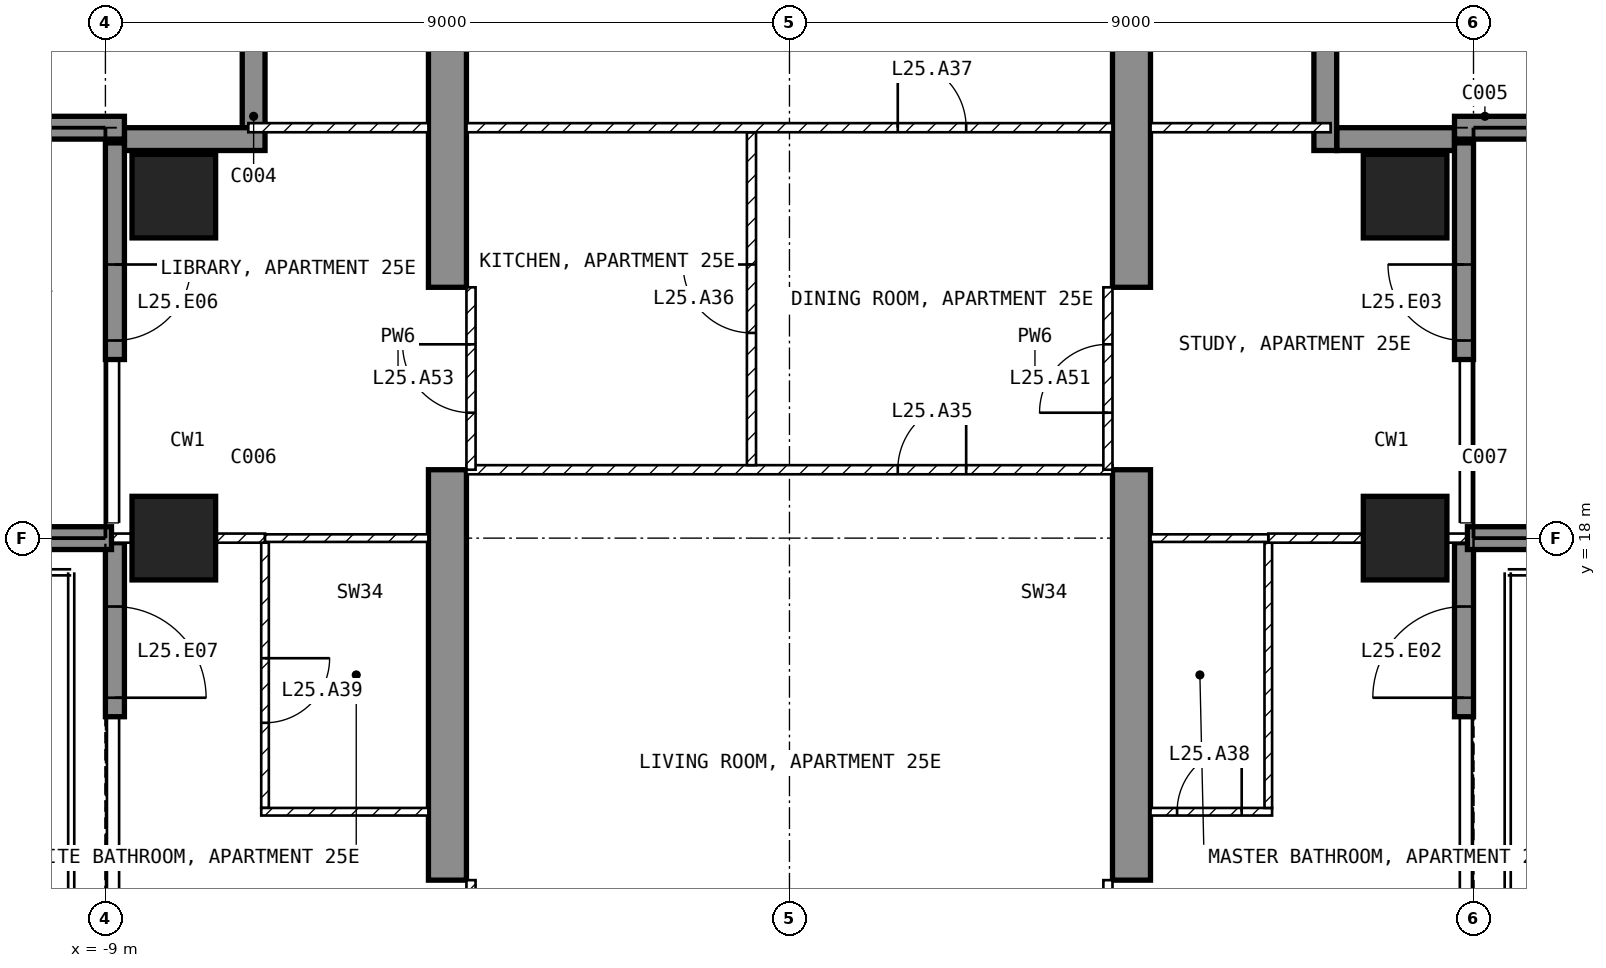
"""IFC4 building model, lengths in metres.
Left out: names, types, materials, properties, quantities, classifications, styles, units other than length and angle.
Written with IfcOpenShell. Run it as: python <this file> out.ifc"""

import sys

from ifc_helpers import new_model, si_unit, direction, frame, frame_2d, origin, origin_2d, place, context, subcontext, project, spatial, polyline, rectangle, outline, extrude, element, fill, save


model = new_model("IFC4")
c1 = context("Model", 3, precision=1e-05, world=origin(), true_north=direction((0.0, 1.0)))
c2 = subcontext(c1, "Body", "Model", "MODEL_VIEW")
j1 = project(units=[si_unit("LENGTHUNIT", "METRE"), si_unit("PLANEANGLEUNIT", "RADIAN")], contexts=[c1])
p1 = place(None, origin())
s1 = spatial("IfcSite", under=j1, at=p1, CompositionType="ELEMENT")
p2 = place(p1, origin())
s2 = spatial("IfcBuilding", under=s1, at=p2, CompositionType="ELEMENT")
p3 = place(p2, frame((0.0, 0.0, 109.4)))
s3 = spatial("IfcBuildingStorey", under=s2, at=p3, CompositionType="ELEMENT", Elevation=109.4)
for number, where, z_axis, x_axis in (
    (1, (-8.1, 18.0, -0.25), (0.0, 0.0, 1.0), (1.0, 0.0, 0.0)),
    (2, (-8.1, 22.5, -0.25), (0.0, 0.0, 1.0), (1.0, 0.0, 0.0)),
    (3, (8.1, 18.0, -0.25), (0.0, 0.0, 1.0), (1.0, 0.0, 0.0)),
    (4, (8.1, 22.5, -0.25), (0.0, 0.0, 1.0), (1.0, 0.0, 0.0)),
):
    element("IfcColumn", number, at=place(p3, frame(where, z_axis=z_axis, x_axis=x_axis)), inside=s3, PredefinedType="COLUMN", context=c2, shape_type="SweptSolid", body=[
        extrude(rectangle(XDim=1.1, YDim=1.1, at=origin_2d()), origin(), (0.0, 0.0, 1.0), 3.5),
    ])
for number, where, z_axis, x_axis in (
    (5, (-4.75, 9.0, -0.25), (1.0, 0.0, 0.0), (0.0, 1.0, 0.0)),
    (6, (4.25, 9.0, -0.25), (1.0, 0.0, 0.0), (0.0, 1.0, 0.0)),
):
    element("IfcWall", number, at=place(p3, frame(where, z_axis=z_axis, x_axis=x_axis)), inside=s3, PredefinedType="SHEAR", context=c2, shape_type="SweptSolid", body=[
        extrude(outline(polyline([(0.0, 0.0), (2.1, 0.0), (2.1, 2.65), (4.5, 2.65), (4.5, 0.0), (9.9, 0.0), (9.9, 2.65), (12.3, 2.65), (12.3, 0.0), (16.55, 0.0), (16.55, 3.5), (0.0, 3.5), (0.0, 0.0)])), origin(), (0.0, 0.0, 1.0), 0.5),
    ])
p4 = place(p3, frame((8.875, 15.65, 0.0), z_axis=(0.0, 0.0, 1.0), x_axis=(0.0, 1.0, 0.0)))
e7 = element("IfcWall", 7, at=p4, inside=s3, PredefinedType="SOLIDWALL", context=c2, shape_type="SweptSolid", body=[
    extrude(rectangle(XDim=2.29, YDim=0.25, at=frame_2d((1.145, 0.0))), origin(), (0.0, 0.0, 1.0), 3.25),
])
p5 = place(p4, frame((0.25, 0.0, 0.0)))
e8 = element("IfcOpeningElement", 8, at=p5, cuts=e7, PredefinedType="OPENING", context=c2, shape_type="SweptSolid", body=[
    extrude(rectangle(XDim=1.2, YDim=2.4, at=frame_2d((0.6, 1.2))), frame((0.0, 0.135, 0.0), z_axis=(0.0, -1.0, 0.0), x_axis=(1.0, 0.0, 0.0)), (0.0, 0.0, 1.0), 0.27),
])
p6 = place(p3, frame((8.875, 20.35, 0.0), z_axis=(0.0, 0.0, 1.0), x_axis=(0.0, 1.0, 0.0)))
e9 = element("IfcWall", 9, at=p6, inside=s3, PredefinedType="SOLIDWALL", context=c2, shape_type="SweptSolid", body=[
    extrude(rectangle(XDim=2.85, YDim=0.25, at=frame_2d((1.425, 0.0))), origin(), (0.0, 0.0, 1.0), 3.25),
])
p7 = place(p6, frame((0.25, 0.0, 0.0)))
e10 = element("IfcOpeningElement", 10, at=p7, cuts=e9, PredefinedType="OPENING", context=c2, shape_type="SweptSolid", body=[
    extrude(rectangle(XDim=1.0, YDim=2.4, at=frame_2d((0.5, 1.2))), frame((0.0, 0.135, 0.0), z_axis=(0.0, -1.0, 0.0), x_axis=(1.0, 0.0, 0.0)), (0.0, 0.0, 1.0), 0.27),
])
p8 = place(p3, frame((-8.875, 23.2, 0.0), z_axis=(0.0, 0.0, 1.0), x_axis=(0.0, -1.0, 0.0)))
e11 = element("IfcWall", 11, at=p8, inside=s3, PredefinedType="SOLIDWALL", context=c2, shape_type="SweptSolid", body=[
    extrude(rectangle(XDim=2.85, YDim=0.25, at=frame_2d((1.425, 0.0))), origin(), (0.0, 0.0, 1.0), 3.25),
])
p9 = place(p8, frame((1.6, 0.0, 0.0)))
e12 = element("IfcOpeningElement", 12, at=p9, cuts=e11, PredefinedType="OPENING", context=c2, shape_type="SweptSolid", body=[
    extrude(rectangle(XDim=1.0, YDim=2.4, at=frame_2d((0.5, 1.2))), frame((0.0, 0.135, 0.0), z_axis=(0.0, -1.0, 0.0), x_axis=(1.0, 0.0, 0.0)), (0.0, 0.0, 1.0), 0.27),
])
p10 = place(p3, frame((-8.875, 17.94, 0.0), z_axis=(0.0, 0.0, 1.0), x_axis=(0.0, -1.0, 0.0)))
e13 = element("IfcWall", 13, at=p10, inside=s3, PredefinedType="SOLIDWALL", context=c2, shape_type="SweptSolid", body=[
    extrude(rectangle(XDim=2.29, YDim=0.25, at=frame_2d((1.145, 0.0))), origin(), (0.0, 0.0, 1.0), 3.25),
])
p11 = place(p10, frame((0.84, 0.0, 0.0)))
e14 = element("IfcOpeningElement", 14, at=p11, cuts=e13, PredefinedType="OPENING", context=c2, shape_type="SweptSolid", body=[
    extrude(rectangle(XDim=1.2, YDim=2.4, at=frame_2d((0.6, 1.2))), frame((0.0, 0.135, 0.0), z_axis=(0.0, -1.0, 0.0), x_axis=(1.0, 0.0, 0.0)), (0.0, 0.0, 1.0), 0.27),
])
p12 = place(p3, frame((8.75, 23.25, 0.0), z_axis=(0.0, 0.0, 1.0), x_axis=(-1.0, 0.0, 0.0)))
e15 = element("IfcWall", 15, at=p12, inside=s3, PredefinedType="SOLIDWALL", context=c2, shape_type="SweptSolid", body=[
    extrude(rectangle(XDim=1.55, YDim=0.3, at=frame_2d((0.775, 0.0))), origin(), (0.0, 0.0, 1.0), 3.25),
])
p13 = place(p3, frame((7.05, 23.1, 0.0), z_axis=(0.0, 0.0, 1.0), x_axis=(0.0, 1.0, 0.0)))
e16 = element("IfcWall", 16, at=p13, inside=s3, PredefinedType="SOLIDWALL", context=c2, shape_type="SweptSolid", body=[
    extrude(rectangle(XDim=1.8, YDim=0.3, at=frame_2d((0.9, 0.0))), origin(), (0.0, 0.0, 1.0), 3.25),
])
p14 = place(p3, frame((-7.05, 25.2, 0.0), z_axis=(0.0, 0.0, 1.0), x_axis=(0.0, -1.0, 0.0)))
e17 = element("IfcWall", 17, at=p14, inside=s3, PredefinedType="SOLIDWALL", context=c2, shape_type="SweptSolid", body=[
    extrude(rectangle(XDim=1.8, YDim=0.3, at=frame_2d((0.9, 0.0))), origin(), (0.0, 0.0, 1.0), 3.25),
])
p15 = place(p3, frame((-6.9, 23.25, 0.0), z_axis=(0.0, 0.0, 1.0), x_axis=(-1.0, 0.0, 0.0)))
e18 = element("IfcWall", 18, at=p15, inside=s3, PredefinedType="SOLIDWALL", context=c2, shape_type="SweptSolid", body=[
    extrude(rectangle(XDim=1.85, YDim=0.3, at=frame_2d((0.925, 0.0))), origin(), (0.0, 0.0, 1.0), 3.25),
])
p16 = place(p3, frame((-8.92, 18.0, 0.0), z_axis=(0.0, 0.0, 1.0), x_axis=(-1.0, 0.0, 0.0)))
e19 = element("IfcWall", 19, at=p16, inside=s3, PredefinedType="SOLIDWALL", context=c2, shape_type="SweptSolid", body=[
    extrude(rectangle(XDim=2.82, YDim=0.3, at=frame_2d((1.41, 0.0))), origin(), (0.0, 0.0, 1.0), 3.25),
])
p17 = place(p3, frame((-8.75, 23.4, 0.0), z_axis=(0.0, 0.0, 1.0), x_axis=(-1.0, 0.0, 0.0)))
e20 = element("IfcWall", 20, at=p17, inside=s3, PredefinedType="SOLIDWALL", context=c2, shape_type="SweptSolid", body=[
    extrude(rectangle(XDim=2.95, YDim=0.3, at=frame_2d((1.475, 0.0))), origin(), (0.0, 0.0, 1.0), 3.25),
])
p18 = place(p3, frame((8.92, 18.0, 0.0), z_axis=(0.0, 0.0, 1.0), x_axis=(1.0, 0.0, 0.0)))
e21 = element("IfcWall", 21, at=p18, inside=s3, PredefinedType="SOLIDWALL", context=c2, shape_type="SweptSolid", body=[
    extrude(rectangle(XDim=2.82, YDim=0.3, at=frame_2d((1.41, 0.0))), origin(), (0.0, 0.0, 1.0), 3.25),
])
p19 = place(p3, frame((8.75, 23.4, 0.0), z_axis=(0.0, 0.0, 1.0), x_axis=(1.0, 0.0, 0.0)))
e22 = element("IfcWall", 22, at=p19, inside=s3, PredefinedType="SOLIDWALL", context=c2, shape_type="SweptSolid", body=[
    extrude(rectangle(XDim=2.95, YDim=0.3, at=frame_2d((1.475, 0.0))), origin(), (0.0, 0.0, 1.0), 3.25),
])
p20 = place(p3, frame((-4.25, 18.9, 0.0), z_axis=(0.0, 0.0, 1.0), x_axis=(1.0, 0.0, 0.0)))
e23 = element("IfcWall", 23, at=p20, inside=s3, PredefinedType="PARTITIONING", context=c2, shape_type="SweptSolid", body=[
    extrude(rectangle(XDim=8.5, YDim=0.12, at=frame_2d((4.25, 0.0))), origin(), (0.0, 0.0, 1.0), 3.25),
])
p21 = place(p20, frame((5.675, 0.0, 0.0)))
e24 = element("IfcOpeningElement", 24, at=p21, cuts=e23, PredefinedType="OPENING", context=c2, shape_type="SweptSolid", body=[
    extrude(rectangle(XDim=0.9, YDim=2.1, at=frame_2d((0.45, 1.05))), frame((0.0, 0.07, 0.0), z_axis=(0.0, -1.0, 0.0), x_axis=(1.0, 0.0, 0.0)), (0.0, 0.0, 1.0), 0.14),
])
p22 = place(p3, frame((-0.5, 18.96, 0.0), z_axis=(0.0, 0.0, 1.0), x_axis=(0.0, 1.0, 0.0)))
e25 = element("IfcWall", 25, at=p22, inside=s3, PredefinedType="PARTITIONING", context=c2, shape_type="SweptSolid", body=[
    extrude(rectangle(XDim=4.38, YDim=0.12, at=frame_2d((2.19, 0.0))), origin(), (0.0, 0.0, 1.0), 3.25),
])
p23 = place(p22, frame((1.74, 0.0, 0.0)))
e26 = element("IfcOpeningElement", 26, at=p23, cuts=e25, PredefinedType="OPENING", context=c2, shape_type="SweptSolid", body=[
    extrude(rectangle(XDim=0.9, YDim=2.1, at=frame_2d((0.45, 1.05))), frame((0.0, 0.07, 0.0), z_axis=(0.0, -1.0, 0.0), x_axis=(1.0, 0.0, 0.0)), (0.0, 0.0, 1.0), 0.14),
])
p24 = place(p3, frame((-4.25, 23.4, 0.0), z_axis=(0.0, 0.0, 1.0), x_axis=(1.0, 0.0, 0.0)))
e27 = element("IfcWall", 27, at=p24, inside=s3, PredefinedType="PARTITIONING", context=c2, shape_type="SweptSolid", body=[
    extrude(rectangle(XDim=8.5, YDim=0.12, at=frame_2d((4.25, 0.0))), origin(), (0.0, 0.0, 1.0), 3.25),
])
p25 = place(p24, frame((5.675, 0.0, 0.0)))
e28 = element("IfcOpeningElement", 28, at=p25, cuts=e27, PredefinedType="OPENING", context=c2, shape_type="SweptSolid", body=[
    extrude(rectangle(XDim=0.9, YDim=2.1, at=frame_2d((0.45, 1.05))), frame((0.0, 0.07, 0.0), z_axis=(0.0, -1.0, 0.0), x_axis=(1.0, 0.0, 0.0)), (0.0, 0.0, 1.0), 0.14),
])
p26 = place(p3, frame((4.75, 14.4, 0.0), z_axis=(0.0, 0.0, 1.0), x_axis=(1.0, 0.0, 0.0)))
e29 = element("IfcWall", 29, at=p26, inside=s3, PredefinedType="PARTITIONING", context=c2, shape_type="SweptSolid", body=[
    extrude(rectangle(XDim=1.6, YDim=0.1, at=frame_2d((0.8, 0.0))), origin(), (0.0, 0.0, 1.0), 3.25),
])
p27 = place(p26, frame((0.35, 0.0, 0.0)))
e30 = element("IfcOpeningElement", 30, at=p27, cuts=e29, PredefinedType="OPENING", context=c2, shape_type="SweptSolid", body=[
    extrude(rectangle(XDim=0.85, YDim=2.1, at=frame_2d((0.425, 1.05))), frame((0.0, 0.06, 0.0), z_axis=(0.0, -1.0, 0.0), x_axis=(1.0, 0.0, 0.0)), (0.0, 0.0, 1.0), 0.12),
])
p28 = place(p3, frame((6.3, 14.45, 0.0), z_axis=(0.0, 0.0, 1.0), x_axis=(0.0, 1.0, 0.0)))
e31 = element("IfcWall", 31, at=p28, inside=s3, PredefinedType="PARTITIONING", context=c2, shape_type="SweptSolid", body=[
    extrude(rectangle(XDim=3.49, YDim=0.1, at=frame_2d((1.745, 0.0))), origin(), (0.0, 0.0, 1.0), 3.25),
])
p29 = place(p3, frame((6.3, 18.0, 0.0), z_axis=(0.0, 0.0, 1.0), x_axis=(1.0, 0.0, 0.0)))
e32 = element("IfcWall", 32, at=p29, inside=s3, PredefinedType="PARTITIONING", context=c2, shape_type="SweptSolid", body=[
    extrude(rectangle(XDim=2.62, YDim=0.12, at=frame_2d((1.31, 0.0))), origin(), (0.0, 0.0, 1.0), 2.414),
])
p30 = place(p3, frame((4.75, 18.0, 0.0), z_axis=(0.0, 0.0, 1.0), x_axis=(1.0, 0.0, 0.0)))
e33 = element("IfcWall", 33, at=p30, inside=s3, PredefinedType="PARTITIONING", context=c2, shape_type="SweptSolid", body=[
    extrude(rectangle(XDim=1.55, YDim=0.1, at=frame_2d((0.775, 0.0))), origin(), (0.0, 0.0, 1.0), 2.414),
])
p31 = place(p3, frame((4.75, 23.4, 0.0), z_axis=(0.0, 0.0, 1.0), x_axis=(1.0, 0.0, 0.0)))
e34 = element("IfcWall", 34, at=p31, inside=s3, PredefinedType="PARTITIONING", context=c2, shape_type="SweptSolid", body=[
    extrude(rectangle(XDim=2.37, YDim=0.12, at=frame_2d((1.185, 0.0))), origin(), (0.0, 0.0, 1.0), 3.25),
])
p32 = place(p3, frame((-6.9, 17.94, 0.0), z_axis=(0.0, 0.0, 1.0), x_axis=(0.0, -1.0, 0.0)))
e35 = element("IfcWall", 35, at=p32, inside=s3, PredefinedType="PARTITIONING", context=c2, shape_type="SweptSolid", body=[
    extrude(rectangle(XDim=3.49, YDim=0.1, at=frame_2d((1.745, 0.0))), origin(), (0.0, 0.0, 1.0), 3.25),
])
p33 = place(p32, frame((1.52, 0.0, 0.0)))
e36 = element("IfcOpeningElement", 36, at=p33, cuts=e35, PredefinedType="OPENING", context=c2, shape_type="SweptSolid", body=[
    extrude(rectangle(XDim=0.85, YDim=2.1, at=frame_2d((0.425, 1.05))), frame((0.0, 0.06, 0.0), z_axis=(0.0, -1.0, 0.0), x_axis=(1.0, 0.0, 0.0)), (0.0, 0.0, 1.0), 0.12),
])
p34 = place(p3, frame((-6.95, 14.4, 0.0), z_axis=(0.0, 0.0, 1.0), x_axis=(1.0, 0.0, 0.0)))
e37 = element("IfcWall", 37, at=p34, inside=s3, PredefinedType="PARTITIONING", context=c2, shape_type="SweptSolid", body=[
    extrude(rectangle(XDim=2.2, YDim=0.1, at=frame_2d((1.1, 0.0))), origin(), (0.0, 0.0, 1.0), 3.25),
])
p35 = place(p3, frame((-8.92, 18.0, 0.0), z_axis=(0.0, 0.0, 1.0), x_axis=(1.0, 0.0, 0.0)))
e38 = element("IfcWall", 38, at=p35, inside=s3, PredefinedType="PARTITIONING", context=c2, shape_type="SweptSolid", body=[
    extrude(rectangle(XDim=2.02, YDim=0.12, at=frame_2d((1.01, 0.0))), origin(), (0.0, 0.0, 1.0), 2.414),
])
p36 = place(p3, frame((-6.9, 18.0, 0.0), z_axis=(0.0, 0.0, 1.0), x_axis=(1.0, 0.0, 0.0)))
e39 = element("IfcWall", 39, at=p36, inside=s3, PredefinedType="PARTITIONING", context=c2, shape_type="SweptSolid", body=[
    extrude(rectangle(XDim=2.15, YDim=0.1, at=frame_2d((1.075, 0.0))), origin(), (0.0, 0.0, 1.0), 2.414),
])
p37 = place(p3, frame((-7.12, 23.4, 0.0), z_axis=(0.0, 0.0, 1.0), x_axis=(1.0, 0.0, 0.0)))
e40 = element("IfcWall", 40, at=p37, inside=s3, PredefinedType="PARTITIONING", context=c2, shape_type="SweptSolid", body=[
    extrude(rectangle(XDim=2.37, YDim=0.12, at=frame_2d((1.185, 0.0))), origin(), (0.0, 0.0, 1.0), 3.25),
])
p38 = place(p3, frame((4.19, 11.1, 0.0), z_axis=(0.0, 0.0, 1.0), x_axis=(0.0, 1.0, 0.0)))
e41 = element("IfcWall", 41, at=p38, inside=s3, PredefinedType="PARTITIONING", context=c2, shape_type="SweptSolid", body=[
    extrude(rectangle(XDim=2.4, YDim=0.12, at=frame_2d((1.2, 0.0))), origin(), (0.0, 0.0, 1.0), 2.4),
])
p39 = place(p38, frame((0.75, 0.0, 0.0)))
e42 = element("IfcOpeningElement", 42, at=p39, cuts=e41, PredefinedType="OPENING", context=c2, shape_type="SweptSolid", body=[
    extrude(rectangle(XDim=0.9, YDim=2.1, at=frame_2d((0.45, 1.05))), frame((0.0, 0.07, 0.0), z_axis=(0.0, -1.0, 0.0), x_axis=(1.0, 0.0, 0.0)), (0.0, 0.0, 1.0), 0.14),
])
p40 = place(p3, frame((4.19, 18.9, 0.0), z_axis=(0.0, 0.0, 1.0), x_axis=(0.0, 1.0, 0.0)))
e43 = element("IfcWall", 43, at=p40, inside=s3, PredefinedType="PARTITIONING", context=c2, shape_type="SweptSolid", body=[
    extrude(rectangle(XDim=2.4, YDim=0.12, at=frame_2d((1.2, 0.0))), origin(), (0.0, 0.0, 1.0), 2.4),
])
p41 = place(p40, frame((0.75, 0.0, 0.0)))
e44 = element("IfcOpeningElement", 44, at=p41, cuts=e43, PredefinedType="OPENING", context=c2, shape_type="SweptSolid", body=[
    extrude(rectangle(XDim=0.9, YDim=2.1, at=frame_2d((0.45, 1.05))), frame((0.0, 0.07, 0.0), z_axis=(0.0, -1.0, 0.0), x_axis=(1.0, 0.0, 0.0)), (0.0, 0.0, 1.0), 0.14),
])
p42 = place(p3, frame((-4.19, 11.1, 0.0), z_axis=(0.0, 0.0, 1.0), x_axis=(0.0, 1.0, 0.0)))
e45 = element("IfcWall", 45, at=p42, inside=s3, PredefinedType="PARTITIONING", context=c2, shape_type="SweptSolid", body=[
    extrude(rectangle(XDim=2.4, YDim=0.12, at=frame_2d((1.2, 0.0))), origin(), (0.0, 0.0, 1.0), 2.4),
])
p43 = place(p42, frame((0.75, 0.0, 0.0)))
e46 = element("IfcOpeningElement", 46, at=p43, cuts=e45, PredefinedType="OPENING", context=c2, shape_type="SweptSolid", body=[
    extrude(rectangle(XDim=0.9, YDim=2.1, at=frame_2d((0.45, 1.05))), frame((0.0, 0.07, 0.0), z_axis=(0.0, -1.0, 0.0), x_axis=(1.0, 0.0, 0.0)), (0.0, 0.0, 1.0), 0.14),
])
p44 = place(p3, frame((-4.19, 18.9, 0.0), z_axis=(0.0, 0.0, 1.0), x_axis=(0.0, 1.0, 0.0)))
e47 = element("IfcWall", 47, at=p44, inside=s3, PredefinedType="PARTITIONING", context=c2, shape_type="SweptSolid", body=[
    extrude(rectangle(XDim=2.4, YDim=0.12, at=frame_2d((1.2, 0.0))), origin(), (0.0, 0.0, 1.0), 2.4),
])
p45 = place(p44, frame((0.75, 0.0, 0.0)))
e48 = element("IfcOpeningElement", 48, at=p45, cuts=e47, PredefinedType="OPENING", context=c2, shape_type="SweptSolid", body=[
    extrude(rectangle(XDim=0.9, YDim=2.1, at=frame_2d((0.45, 1.05))), frame((0.0, 0.07, 0.0), z_axis=(0.0, -1.0, 0.0), x_axis=(1.0, 0.0, 0.0)), (0.0, 0.0, 1.0), 0.14),
])
p46 = place(p5, origin())
e49 = element("IfcDoor", 49, at=p46, inside=s3, OperationType="SINGLE_SWING_LEFT", PredefinedType="DOOR", context=c2, shape_type="SweptSolid", body=[
    extrude(rectangle(XDim=1.2, YDim=2.4, at=frame_2d((0.6, 1.2))), frame((0.0, 0.025, 0.0), z_axis=(0.0, -1.0, 0.0), x_axis=(1.0, 0.0, 0.0)), (0.0, 0.0, 1.0), 0.05),
])
fill(e8, e49)
p47 = place(p7, origin())
e50 = element("IfcDoor", 50, at=p47, inside=s3, OperationType="SINGLE_SWING_RIGHT", PredefinedType="DOOR", context=c2, shape_type="SweptSolid", body=[
    extrude(rectangle(XDim=1.0, YDim=2.4, at=frame_2d((0.5, 1.2))), frame((0.0, 0.025, 0.0), z_axis=(0.0, -1.0, 0.0), x_axis=(1.0, 0.0, 0.0)), (0.0, 0.0, 1.0), 0.05),
])
fill(e10, e50)
p48 = place(p9, origin())
e51 = element("IfcDoor", 51, at=p48, inside=s3, OperationType="SINGLE_SWING_LEFT", PredefinedType="DOOR", context=c2, shape_type="SweptSolid", body=[
    extrude(rectangle(XDim=1.0, YDim=2.4, at=frame_2d((0.5, 1.2))), frame((0.0, 0.025, 0.0), z_axis=(0.0, -1.0, 0.0), x_axis=(1.0, 0.0, 0.0)), (0.0, 0.0, 1.0), 0.05),
])
fill(e12, e51)
p49 = place(p11, origin())
e52 = element("IfcDoor", 52, at=p49, inside=s3, OperationType="SINGLE_SWING_RIGHT", PredefinedType="DOOR", context=c2, shape_type="SweptSolid", body=[
    extrude(rectangle(XDim=1.2, YDim=2.4, at=frame_2d((0.6, 1.2))), frame((0.0, 0.025, 0.0), z_axis=(0.0, -1.0, 0.0), x_axis=(1.0, 0.0, 0.0)), (0.0, 0.0, 1.0), 0.05),
])
fill(e14, e52)
p50 = place(p21, origin())
e53 = element("IfcDoor", 53, at=p50, inside=s3, OperationType="SINGLE_SWING_RIGHT", PredefinedType="DOOR", context=c2, shape_type="SweptSolid", body=[
    extrude(rectangle(XDim=0.9, YDim=2.1, at=frame_2d((0.45, 1.05))), frame((0.0, 0.025, 0.0), z_axis=(0.0, -1.0, 0.0), x_axis=(1.0, 0.0, 0.0)), (0.0, 0.0, 1.0), 0.05),
])
fill(e24, e53)
p51 = place(p23, origin())
e54 = element("IfcDoor", 54, at=p51, inside=s3, OperationType="SINGLE_SWING_RIGHT", PredefinedType="DOOR", context=c2, shape_type="SweptSolid", body=[
    extrude(rectangle(XDim=0.9, YDim=2.1, at=frame_2d((0.45, 1.05))), frame((0.0, 0.025, 0.0), z_axis=(0.0, -1.0, 0.0), x_axis=(1.0, 0.0, 0.0)), (0.0, 0.0, 1.0), 0.05),
])
fill(e26, e54)
p52 = place(p25, origin())
e55 = element("IfcDoor", 55, at=p52, inside=s3, OperationType="SINGLE_SWING_LEFT", PredefinedType="DOOR", context=c2, shape_type="SweptSolid", body=[
    extrude(rectangle(XDim=0.9, YDim=2.1, at=frame_2d((0.45, 1.05))), frame((0.0, 0.025, 0.0), z_axis=(0.0, -1.0, 0.0), x_axis=(1.0, 0.0, 0.0)), (0.0, 0.0, 1.0), 0.05),
])
fill(e28, e55)
p53 = place(p27, origin())
e56 = element("IfcDoor", 56, at=p53, inside=s3, OperationType="SINGLE_SWING_RIGHT", PredefinedType="DOOR", context=c2, shape_type="SweptSolid", body=[
    extrude(rectangle(XDim=0.85, YDim=2.1, at=frame_2d((0.425, 1.05))), frame((0.0, 0.025, 0.0), z_axis=(0.0, -1.0, 0.0), x_axis=(1.0, 0.0, 0.0)), (0.0, 0.0, 1.0), 0.05),
])
fill(e30, e56)
p54 = place(p33, origin())
e57 = element("IfcDoor", 57, at=p54, inside=s3, OperationType="SINGLE_SWING_LEFT", PredefinedType="DOOR", context=c2, shape_type="SweptSolid", body=[
    extrude(rectangle(XDim=0.85, YDim=2.1, at=frame_2d((0.425, 1.05))), frame((0.0, 0.025, 0.0), z_axis=(0.0, -1.0, 0.0), x_axis=(1.0, 0.0, 0.0)), (0.0, 0.0, 1.0), 0.05),
])
fill(e36, e57)
p55 = place(p41, origin())
e58 = element("IfcDoor", 58, at=p55, inside=s3, OperationType="SINGLE_SWING_LEFT", PredefinedType="DOOR", context=c2, shape_type="SweptSolid", body=[
    extrude(rectangle(XDim=0.9, YDim=2.1, at=frame_2d((0.45, 1.05))), frame((0.0, 0.025, 0.0), z_axis=(0.0, -1.0, 0.0), x_axis=(1.0, 0.0, 0.0)), (0.0, 0.0, 1.0), 0.05),
])
fill(e44, e58)
p56 = place(p45, origin())
e59 = element("IfcDoor", 59, at=p56, inside=s3, OperationType="SINGLE_SWING_RIGHT", PredefinedType="DOOR", context=c2, shape_type="SweptSolid", body=[
    extrude(rectangle(XDim=0.9, YDim=2.1, at=frame_2d((0.45, 1.05))), frame((0.0, 0.025, 0.0), z_axis=(0.0, -1.0, 0.0), x_axis=(1.0, 0.0, 0.0)), (0.0, 0.0, 1.0), 0.05),
])
fill(e48, e59)
save(model, sys.argv[1])
